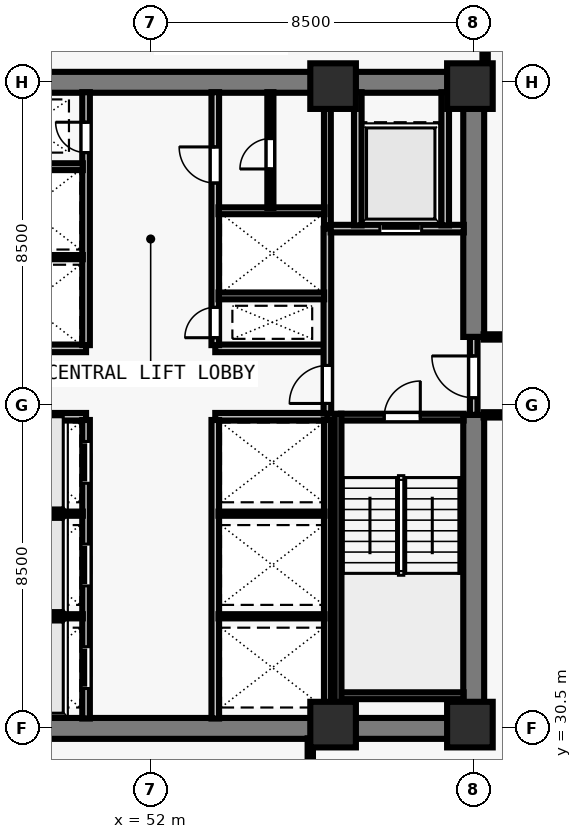
"""IFC4 building model, lengths in metres.
Left out: names, types, materials, properties, quantities, classifications, styles, units other than length and angle.
Written with IfcOpenShell. Run it as: python <this file> out.ifc"""

import sys

from ifc_helpers import new_model, si_unit, direction, frame, frame_2d, origin, origin_2d, place, context, subcontext, project, spatial, rectangle, extrude, element, fill, save


model = new_model("IFC4")
c1 = context("Model", 3, precision=1e-05, world=origin(), true_north=direction((0.0, 1.0)))
c2 = subcontext(c1, "Body", "Model", "MODEL_VIEW")
j1 = project(units=[si_unit("LENGTHUNIT", "METRE"), si_unit("PLANEANGLEUNIT", "RADIAN")], contexts=[c1])
p1 = place(None, origin())
s1 = spatial("IfcSite", under=j1, at=p1, CompositionType="ELEMENT")
p2 = place(p1, origin())
s2 = spatial("IfcBuilding", under=s1, at=p2, CompositionType="ELEMENT")
p3 = place(p2, frame((0.0, 0.0, 48.0)))
s3 = spatial("IfcBuildingStorey", under=s2, at=p3, CompositionType="ELEMENT", Elevation=48.0)
for number, where, z_axis, x_axis in (
    (1, (56.8, 30.6, 0.0), (0.0, 0.0, 1.0), (1.0, 0.0, 0.0)),
    (2, (60.4, 30.6, 0.0), (0.0, 0.0, 1.0), (1.0, 0.0, 0.0)),
    (3, (56.8, 47.4, 0.0), (0.0, 0.0, 1.0), (1.0, 0.0, 0.0)),
    (4, (60.4, 47.4, 0.0), (0.0, 0.0, 1.0), (1.0, 0.0, 0.0)),
):
    element("IfcColumn", number, at=place(p3, frame(where, z_axis=z_axis, x_axis=x_axis)), inside=s3, PredefinedType="COLUMN", context=c2, shape_type="SweptSolid", body=[
        extrude(rectangle(XDim=1.2, YDim=1.2, at=origin_2d()), origin(), (0.0, 0.0, 1.0), 3.5),
    ])
for number, where, z_axis, x_axis in (
    (5, (43.225, 30.5, 0.0), (0.0, 0.0, 1.0), (1.0, 0.0, 0.0)),
    (6, (43.225, 47.5, 0.0), (0.0, 0.0, 1.0), (1.0, 0.0, 0.0)),
):
    element("IfcWall", number, at=place(p3, frame(where, z_axis=z_axis, x_axis=x_axis)), inside=s3, PredefinedType="SHEAR", context=c2, shape_type="SweptSolid", body=[
        extrude(rectangle(XDim=17.55, YDim=0.55, at=frame_2d((8.775, 0.0))), origin(), (0.0, 0.0, 1.0), 3.28),
    ])
p4 = place(p3, frame((60.5, 30.765, 0.0), z_axis=(0.0, 0.0, 1.0), x_axis=(0.0, 1.0, 0.0)))
e7 = element("IfcWall", 7, at=p4, inside=s3, PredefinedType="SHEAR", context=c2, shape_type="SweptSolid", body=[
    extrude(rectangle(XDim=7.985, YDim=0.55, at=frame_2d((3.993, 0.0))), origin(), (0.0, 0.0, 1.0), 3.28),
])
p5 = place(p3, frame((60.5, 40.8, 0.0), z_axis=(0.0, 0.0, 1.0), x_axis=(0.0, 1.0, 0.0)))
e8 = element("IfcWall", 8, at=p5, inside=s3, PredefinedType="SHEAR", context=c2, shape_type="SweptSolid", body=[
    extrude(rectangle(XDim=6.435, YDim=0.55, at=frame_2d((3.218, 0.0))), origin(), (0.0, 0.0, 1.0), 3.28),
])
for number, where, z_axis, x_axis in (
    (9, (47.35, 38.7, 0.0), (0.0, 0.0, 1.0), (1.0, 0.0, 0.0)),
    (10, (47.35, 40.5, 0.0), (0.0, 0.0, 1.0), (1.0, 0.0, 0.0)),
    (11, (53.7, 38.7, 0.0), (0.0, 0.0, 1.0), (1.0, 0.0, 0.0)),
    (12, (53.7, 40.5, 0.0), (0.0, 0.0, 1.0), (1.0, 0.0, 0.0)),
):
    element("IfcWall", number, at=place(p3, frame(where, z_axis=z_axis, x_axis=x_axis)), inside=s3, PredefinedType="SOLIDWALL", context=c2, shape_type="SweptSolid", body=[
        extrude(rectangle(XDim=2.95, YDim=0.2, at=frame_2d((1.475, 0.0))), origin(), (0.0, 0.0, 1.0), 3.28),
    ])
p6 = place(p3, frame((50.3, 30.76, 0.0), z_axis=(0.0, 0.0, 1.0), x_axis=(0.0, 1.0, 0.0)))
e13 = element("IfcWall", 13, at=p6, inside=s3, PredefinedType="SOLIDWALL", context=c2, shape_type="SweptSolid", body=[
    extrude(rectangle(XDim=7.855, YDim=0.2, at=frame_2d((3.927, 0.0))), origin(), (0.0, 0.0, 1.0), 3.28),
])
p7 = place(p6, frame((0.79, 0.0, 0.0)))
e14 = element("IfcOpeningElement", 14, at=p7, cuts=e13, PredefinedType="OPENING", context=c2, shape_type="SweptSolid", body=[
    extrude(rectangle(XDim=1.1, YDim=2.2, at=frame_2d((0.55, 1.1))), frame((0.0, 0.11, 0.0), z_axis=(0.0, -1.0, 0.0), x_axis=(1.0, 0.0, 0.0)), (0.0, 0.0, 1.0), 0.22),
])
p8 = place(p6, frame((3.49, 0.0, 0.0)))
e15 = element("IfcOpeningElement", 15, at=p8, cuts=e13, PredefinedType="OPENING", context=c2, shape_type="SweptSolid", body=[
    extrude(rectangle(XDim=1.1, YDim=2.2, at=frame_2d((0.55, 1.1))), frame((0.0, 0.11, 0.0), z_axis=(0.0, -1.0, 0.0), x_axis=(1.0, 0.0, 0.0)), (0.0, 0.0, 1.0), 0.22),
])
p9 = place(p6, frame((6.19, 0.0, 0.0)))
e16 = element("IfcOpeningElement", 16, at=p9, cuts=e13, PredefinedType="OPENING", context=c2, shape_type="SweptSolid", body=[
    extrude(rectangle(XDim=1.1, YDim=2.2, at=frame_2d((0.55, 1.1))), frame((0.0, 0.11, 0.0), z_axis=(0.0, -1.0, 0.0), x_axis=(1.0, 0.0, 0.0)), (0.0, 0.0, 1.0), 0.22),
])
p10 = place(p3, frame((53.7, 30.76, 0.0), z_axis=(0.0, 0.0, 1.0), x_axis=(0.0, 1.0, 0.0)))
e17 = element("IfcWall", 17, at=p10, inside=s3, PredefinedType="SOLIDWALL", context=c2, shape_type="SweptSolid", body=[
    extrude(rectangle(XDim=7.855, YDim=0.2, at=frame_2d((3.927, 0.0))), origin(), (0.0, 0.0, 1.0), 3.28),
])
p11 = place(p3, frame((50.3, 40.585, 0.0), z_axis=(0.0, 0.0, 1.0), x_axis=(0.0, 1.0, 0.0)))
e18 = element("IfcWall", 18, at=p11, inside=s3, PredefinedType="SOLIDWALL", context=c2, shape_type="SweptSolid", body=[
    extrude(rectangle(XDim=6.655, YDim=0.2, at=frame_2d((3.328, 0.0))), origin(), (0.0, 0.0, 1.0), 3.28),
])
p12 = place(p11, frame((5.065, 0.0, 0.0)))
e19 = element("IfcOpeningElement", 19, at=p12, cuts=e18, PredefinedType="OPENING", context=c2, shape_type="SweptSolid", body=[
    extrude(rectangle(XDim=0.8, YDim=2.08, at=frame_2d((0.4, 1.04))), frame((0.0, 0.11, 0.0), z_axis=(0.0, -1.0, 0.0), x_axis=(1.0, 0.0, 0.0)), (0.0, 0.0, 1.0), 0.22),
])
p13 = place(p3, frame((53.7, 40.585, 0.0), z_axis=(0.0, 0.0, 1.0), x_axis=(0.0, 1.0, 0.0)))
e20 = element("IfcWall", 20, at=p13, inside=s3, PredefinedType="SOLIDWALL", context=c2, shape_type="SweptSolid", body=[
    extrude(rectangle(XDim=6.655, YDim=0.2, at=frame_2d((3.328, 0.0))), origin(), (0.0, 0.0, 1.0), 3.28),
])
p14 = place(p13, frame((0.195, 0.0, 0.0)))
e21 = element("IfcOpeningElement", 21, at=p14, cuts=e20, PredefinedType="OPENING", context=c2, shape_type="SweptSolid", body=[
    extrude(rectangle(XDim=0.8, YDim=2.08, at=frame_2d((0.4, 1.04))), frame((0.0, 0.11, 0.0), z_axis=(0.0, -1.0, 0.0), x_axis=(1.0, 0.0, 0.0)), (0.0, 0.0, 1.0), 0.22),
])
p15 = place(p13, frame((4.265, 0.0, 0.0)))
e22 = element("IfcOpeningElement", 22, at=p15, cuts=e20, PredefinedType="OPENING", context=c2, shape_type="SweptSolid", body=[
    extrude(rectangle(XDim=0.95, YDim=2.12, at=frame_2d((0.475, 1.06))), frame((0.0, 0.11, 0.0), z_axis=(0.0, -1.0, 0.0), x_axis=(1.0, 0.0, 0.0)), (0.0, 0.0, 1.0), 0.22),
])
p16 = place(p3, frame((60.5, 38.75, 0.0), z_axis=(0.0, 0.0, 1.0), x_axis=(0.0, 1.0, 0.0)))
e23 = element("IfcWall", 23, at=p16, inside=s3, PredefinedType="SOLIDWALL", context=c2, shape_type="SweptSolid", body=[
    extrude(rectangle(XDim=2.05, YDim=0.2, at=frame_2d((1.025, 0.0))), origin(), (0.0, 0.0, 1.0), 3.28),
])
p17 = place(p16, frame((0.45, 0.0, 0.0)))
e24 = element("IfcOpeningElement", 24, at=p17, cuts=e23, PredefinedType="OPENING", context=c2, shape_type="SweptSolid", body=[
    extrude(rectangle(XDim=1.1, YDim=2.15, at=frame_2d((0.55, 1.075))), frame((0.0, 0.11, 0.0), z_axis=(0.0, -1.0, 0.0), x_axis=(1.0, 0.0, 0.0)), (0.0, 0.0, 1.0), 0.22),
])
p18 = place(p3, frame((56.65, 38.785, 0.0), z_axis=(0.0, 0.0, 1.0), x_axis=(0.0, 1.0, 0.0)))
e25 = element("IfcWall", 25, at=p18, inside=s3, PredefinedType="SOLIDWALL", context=c2, shape_type="SweptSolid", body=[
    extrude(rectangle(XDim=4.865, YDim=0.2, at=frame_2d((2.433, 0.0))), origin(), (0.0, 0.0, 1.0), 3.28),
])
p19 = place(p18, frame((0.265, 0.0, 0.0)))
e26 = element("IfcOpeningElement", 26, at=p19, cuts=e25, PredefinedType="OPENING", context=c2, shape_type="SweptSolid", body=[
    extrude(rectangle(XDim=1.0, YDim=2.15, at=frame_2d((0.5, 1.075))), frame((0.0, 0.11, 0.0), z_axis=(0.0, -1.0, 0.0), x_axis=(1.0, 0.0, 0.0)), (0.0, 0.0, 1.0), 0.22),
])
p20 = place(p3, frame((56.735, 43.65, 0.0), z_axis=(0.0, 0.0, 1.0), x_axis=(1.0, 0.0, 0.0)))
e27 = element("IfcWall", 27, at=p20, inside=s3, PredefinedType="SOLIDWALL", context=c2, shape_type="SweptSolid", body=[
    extrude(rectangle(XDim=3.505, YDim=0.2, at=frame_2d((1.752, 0.0))), origin(), (0.0, 0.0, 1.0), 3.28),
])
p21 = place(p20, frame((1.295, 0.0, 0.0)))
e28 = element("IfcOpeningElement", 28, at=p21, cuts=e27, PredefinedType="OPENING", context=c2, shape_type="SweptSolid", body=[
    extrude(rectangle(XDim=1.1, YDim=2.2, at=frame_2d((0.55, 1.1))), frame((0.0, 0.11, 0.0), z_axis=(0.0, -1.0, 0.0), x_axis=(1.0, 0.0, 0.0)), (0.0, 0.0, 1.0), 0.22),
])
for number, where, z_axis, x_axis in (
    (29, (57.45, 43.735, 0.0), (0.0, 0.0, 1.0), (0.0, 1.0, 0.0)),
    (30, (59.75, 43.735, 0.0), (0.0, 0.0, 1.0), (0.0, 1.0, 0.0)),
):
    element("IfcWall", number, at=place(p3, frame(where, z_axis=z_axis, x_axis=x_axis)), inside=s3, PredefinedType="SOLIDWALL", context=c2, shape_type="SweptSolid", body=[
        extrude(rectangle(XDim=3.505, YDim=0.2, at=frame_2d((1.752, 0.0))), origin(), (0.0, 0.0, 1.0), 3.28),
    ])
for number, where, z_axis, x_axis in (
    (31, (47.425, 33.45, 0.0), (0.0, 0.0, 1.0), (1.0, 0.0, 0.0)),
    (32, (47.425, 36.15, 0.0), (0.0, 0.0, 1.0), (1.0, 0.0, 0.0)),
):
    element("IfcWall", number, at=place(p3, frame(where, z_axis=z_axis, x_axis=x_axis)), inside=s3, PredefinedType="PARTITIONING", context=c2, shape_type="SweptSolid", body=[
        extrude(rectangle(XDim=2.79, YDim=0.11, at=frame_2d((1.395, 0.0))), origin(), (0.0, 0.0, 1.0), 3.28),
    ])
p22 = place(p3, frame((56.65, 30.76, 0.0), z_axis=(0.0, 0.0, 1.0), x_axis=(0.0, 1.0, 0.0)))
e33 = element("IfcWall", 33, at=p22, inside=s3, PredefinedType="SOLIDWALL", context=c2, shape_type="SweptSolid", body=[
    extrude(rectangle(XDim=7.855, YDim=0.18, at=frame_2d((3.927, 0.0))), origin(), (0.0, 0.0, 1.0), 3.28),
])
for number, where, z_axis, x_axis in (
    (34, (53.785, 33.45, 0.0), (0.0, 0.0, 1.0), (1.0, 0.0, 0.0)),
    (35, (53.785, 36.15, 0.0), (0.0, 0.0, 1.0), (1.0, 0.0, 0.0)),
):
    element("IfcWall", number, at=place(p3, frame(where, z_axis=z_axis, x_axis=x_axis)), inside=s3, PredefinedType="PARTITIONING", context=c2, shape_type="SweptSolid", body=[
        extrude(rectangle(XDim=2.79, YDim=0.11, at=frame_2d((1.395, 0.0))), origin(), (0.0, 0.0, 1.0), 3.28),
    ])
p23 = place(p3, frame((47.435, 42.9, 0.0), z_axis=(0.0, 0.0, 1.0), x_axis=(1.0, 0.0, 0.0)))
e36 = element("IfcWall", 36, at=p23, inside=s3, PredefinedType="PARTITIONING", context=c2, shape_type="SweptSolid", body=[
    extrude(rectangle(XDim=2.78, YDim=0.11, at=frame_2d((1.39, 0.0))), origin(), (0.0, 0.0, 1.0), 3.28),
])
p24 = place(p3, frame((47.425, 45.28, 0.0), z_axis=(0.0, 0.0, 1.0), x_axis=(1.0, 0.0, 0.0)))
e37 = element("IfcWall", 37, at=p24, inside=s3, PredefinedType="SOLIDWALL", context=c2, shape_type="SweptSolid", body=[
    extrude(rectangle(XDim=2.79, YDim=0.18, at=frame_2d((1.395, 0.0))), origin(), (0.0, 0.0, 1.0), 3.28),
])
p25 = place(p3, frame((56.65, 43.735, 0.0), z_axis=(0.0, 0.0, 1.0), x_axis=(0.0, 1.0, 0.0)))
e38 = element("IfcWall", 38, at=p25, inside=s3, PredefinedType="SOLIDWALL", context=c2, shape_type="SweptSolid", body=[
    extrude(rectangle(XDim=3.505, YDim=0.18, at=frame_2d((1.752, 0.0))), origin(), (0.0, 0.0, 1.0), 3.28),
])
p26 = place(p3, frame((53.785, 41.88, 0.0), z_axis=(0.0, 0.0, 1.0), x_axis=(1.0, 0.0, 0.0)))
e39 = element("IfcWall", 39, at=p26, inside=s3, PredefinedType="SOLIDWALL", context=c2, shape_type="SweptSolid", body=[
    extrude(rectangle(XDim=2.78, YDim=0.18, at=frame_2d((1.39, 0.0))), origin(), (0.0, 0.0, 1.0), 3.28),
])
p27 = place(p3, frame((53.785, 44.12, 0.0), z_axis=(0.0, 0.0, 1.0), x_axis=(1.0, 0.0, 0.0)))
e40 = element("IfcWall", 40, at=p27, inside=s3, PredefinedType="SOLIDWALL", context=c2, shape_type="SweptSolid", body=[
    extrude(rectangle(XDim=2.79, YDim=0.18, at=frame_2d((1.395, 0.0))), origin(), (0.0, 0.0, 1.0), 3.28),
])
p28 = place(p3, frame((55.15, 44.195, 0.0), z_axis=(0.0, 0.0, 1.0), x_axis=(0.0, 1.0, 0.0)))
e41 = element("IfcWall", 41, at=p28, inside=s3, PredefinedType="PARTITIONING", context=c2, shape_type="SweptSolid", body=[
    extrude(rectangle(XDim=3.045, YDim=0.16, at=frame_2d((1.522, 0.0))), origin(), (0.0, 0.0, 1.0), 3.28),
])
p29 = place(p28, frame((1.025, 0.0, 0.0)))
e42 = element("IfcOpeningElement", 42, at=p29, cuts=e41, PredefinedType="OPENING", context=c2, shape_type="SweptSolid", body=[
    extrude(rectangle(XDim=0.8, YDim=2.1, at=frame_2d((0.4, 1.05))), frame((0.0, 0.09, 0.0), z_axis=(0.0, -1.0, 0.0), x_axis=(1.0, 0.0, 0.0)), (0.0, 0.0, 1.0), 0.18),
])
for number, where, z_axis, x_axis in (
    (43, (60.76, 38.75, 0.0), (0.0, 0.0, 1.0), (1.0, 0.0, 0.0)),
    (44, (60.76, 40.8, 0.0), (0.0, 0.0, 1.0), (1.0, 0.0, 0.0)),
):
    element("IfcWall", number, at=place(p3, frame(where, z_axis=z_axis, x_axis=x_axis)), inside=s3, PredefinedType="PARTITIONING", context=c2, shape_type="SweptSolid", body=[
        extrude(rectangle(XDim=4.385, YDim=0.14, at=frame_2d((2.192, 0.0))), origin(), (0.0, 0.0, 1.0), 3.28),
    ])
p30 = place(p3, frame((56.2, 25.555, 0.0), z_axis=(0.0, 0.0, 1.0), x_axis=(0.0, 1.0, 0.0)))
e45 = element("IfcWall", 45, at=p30, inside=s3, PredefinedType="PARTITIONING", context=c2, shape_type="SweptSolid", body=[
    extrude(rectangle(XDim=4.685, YDim=0.14, at=frame_2d((2.343, 0.0))), origin(), (0.0, 0.0, 1.0), 2.849),
])
p31 = place(p3, frame((60.8, 47.76, 0.0), z_axis=(0.0, 0.0, 1.0), x_axis=(0.0, 1.0, 0.0)))
e46 = element("IfcWall", 46, at=p31, inside=s3, PredefinedType="PARTITIONING", context=c2, shape_type="SweptSolid", body=[
    extrude(rectangle(XDim=4.685, YDim=0.14, at=frame_2d((2.343, 0.0))), origin(), (0.0, 0.0, 1.0), 2.439),
])
p32 = place(p3, frame((57.005, 38.69, 0.0), z_axis=(0.0, 0.0, 1.0), x_axis=(1.0, 0.0, 0.0)))
e47 = element("IfcWall", 47, at=p32, inside=s3, PredefinedType="SOLIDWALL", context=c2, shape_type="SweptSolid", body=[
    extrude(rectangle(XDim=3.23, YDim=0.18, at=frame_2d((1.615, 0.0))), origin(), (0.0, 0.0, 1.0), 3.28),
])
p33 = place(p32, frame((1.14, 0.0, 0.0)))
e48 = element("IfcOpeningElement", 48, at=p33, cuts=e47, PredefinedType="OPENING", context=c2, shape_type="SweptSolid", body=[
    extrude(rectangle(XDim=0.95, YDim=2.15, at=frame_2d((0.475, 1.075))), frame((0.0, 0.1, 0.0), z_axis=(0.0, -1.0, 0.0), x_axis=(1.0, 0.0, 0.0)), (0.0, 0.0, 1.0), 0.2),
])
p34 = place(p3, frame((57.005, 31.36, 0.0), z_axis=(0.0, 0.0, 1.0), x_axis=(1.0, 0.0, 0.0)))
e49 = element("IfcWall", 49, at=p34, inside=s3, PredefinedType="SOLIDWALL", context=c2, shape_type="SweptSolid", body=[
    extrude(rectangle(XDim=3.23, YDim=0.18, at=frame_2d((1.615, 0.0))), origin(), (0.0, 0.0, 1.0), 3.28),
])
p35 = place(p3, frame((56.93, 38.78, 0.0), z_axis=(0.0, 0.0, 1.0), x_axis=(0.0, -1.0, 0.0)))
e50 = element("IfcWall", 50, at=p35, inside=s3, PredefinedType="SOLIDWALL", context=c2, shape_type="SweptSolid", body=[
    extrude(rectangle(XDim=8.017, YDim=0.18, at=frame_2d((4.009, 0.0))), origin(), (0.0, 0.0, 1.0), 3.28),
])
p36 = place(p17, origin())
e51 = element("IfcDoor", 51, at=p36, inside=s3, OperationType="SINGLE_SWING_RIGHT", PredefinedType="DOOR", context=c2, shape_type="SweptSolid", body=[
    extrude(rectangle(XDim=1.1, YDim=2.15, at=frame_2d((0.55, 1.075))), frame((0.0, 0.025, 0.0), z_axis=(0.0, -1.0, 0.0), x_axis=(1.0, 0.0, 0.0)), (0.0, 0.0, 1.0), 0.05),
])
fill(e24, e51)
p37 = place(p19, origin())
e52 = element("IfcDoor", 52, at=p37, inside=s3, OperationType="SINGLE_SWING_LEFT", PredefinedType="DOOR", context=c2, shape_type="SweptSolid", body=[
    extrude(rectangle(XDim=1.0, YDim=2.15, at=frame_2d((0.5, 1.075))), frame((0.0, 0.025, 0.0), z_axis=(0.0, -1.0, 0.0), x_axis=(1.0, 0.0, 0.0)), (0.0, 0.0, 1.0), 0.05),
])
fill(e26, e52)
p38 = place(p21, origin())
e53 = element("IfcDoor", 53, at=p38, inside=s3, OperationType="SLIDING_TO_LEFT", PredefinedType="DOOR", context=c2, shape_type="SweptSolid", body=[
    extrude(rectangle(XDim=1.1, YDim=2.2, at=frame_2d((0.55, 1.1))), frame((0.0, 0.025, 0.0), z_axis=(0.0, -1.0, 0.0), x_axis=(1.0, 0.0, 0.0)), (0.0, 0.0, 1.0), 0.05),
])
fill(e28, e53)
p39 = place(p7, origin())
e54 = element("IfcDoor", 54, at=p39, inside=s3, OperationType="SLIDING_TO_LEFT", PredefinedType="DOOR", context=c2, shape_type="SweptSolid", body=[
    extrude(rectangle(XDim=1.1, YDim=2.2, at=frame_2d((0.55, 1.1))), frame((0.0, 0.025, 0.0), z_axis=(0.0, -1.0, 0.0), x_axis=(1.0, 0.0, 0.0)), (0.0, 0.0, 1.0), 0.05),
])
fill(e14, e54)
p40 = place(p8, origin())
e55 = element("IfcDoor", 55, at=p40, inside=s3, OperationType="SLIDING_TO_LEFT", PredefinedType="DOOR", context=c2, shape_type="SweptSolid", body=[
    extrude(rectangle(XDim=1.1, YDim=2.2, at=frame_2d((0.55, 1.1))), frame((0.0, 0.025, 0.0), z_axis=(0.0, -1.0, 0.0), x_axis=(1.0, 0.0, 0.0)), (0.0, 0.0, 1.0), 0.05),
])
fill(e15, e55)
p41 = place(p9, origin())
e56 = element("IfcDoor", 56, at=p41, inside=s3, OperationType="SLIDING_TO_LEFT", PredefinedType="DOOR", context=c2, shape_type="SweptSolid", body=[
    extrude(rectangle(XDim=1.1, YDim=2.2, at=frame_2d((0.55, 1.1))), frame((0.0, 0.025, 0.0), z_axis=(0.0, -1.0, 0.0), x_axis=(1.0, 0.0, 0.0)), (0.0, 0.0, 1.0), 0.05),
])
fill(e16, e56)
p42 = place(p12, origin())
e57 = element("IfcDoor", 57, at=p42, inside=s3, OperationType="SINGLE_SWING_RIGHT", PredefinedType="DOOR", context=c2, shape_type="SweptSolid", body=[
    extrude(rectangle(XDim=0.8, YDim=2.08, at=frame_2d((0.4, 1.04))), frame((0.0, 0.025, 0.0), z_axis=(0.0, -1.0, 0.0), x_axis=(1.0, 0.0, 0.0)), (0.0, 0.0, 1.0), 0.05),
])
fill(e19, e57)
p43 = place(p14, origin())
e58 = element("IfcDoor", 58, at=p43, inside=s3, OperationType="SINGLE_SWING_LEFT", PredefinedType="DOOR", context=c2, shape_type="SweptSolid", body=[
    extrude(rectangle(XDim=0.8, YDim=2.08, at=frame_2d((0.4, 1.04))), frame((0.0, 0.025, 0.0), z_axis=(0.0, -1.0, 0.0), x_axis=(1.0, 0.0, 0.0)), (0.0, 0.0, 1.0), 0.05),
])
fill(e21, e58)
p44 = place(p15, origin())
e59 = element("IfcDoor", 59, at=p44, inside=s3, OperationType="SINGLE_SWING_RIGHT", PredefinedType="DOOR", context=c2, shape_type="SweptSolid", body=[
    extrude(rectangle(XDim=0.95, YDim=2.12, at=frame_2d((0.475, 1.06))), frame((0.0, 0.025, 0.0), z_axis=(0.0, -1.0, 0.0), x_axis=(1.0, 0.0, 0.0)), (0.0, 0.0, 1.0), 0.05),
])
fill(e22, e59)
p45 = place(p29, origin())
e60 = element("IfcDoor", 60, at=p45, inside=s3, OperationType="SINGLE_SWING_LEFT", PredefinedType="DOOR", context=c2, shape_type="SweptSolid", body=[
    extrude(rectangle(XDim=0.8, YDim=2.1, at=frame_2d((0.4, 1.05))), frame((0.0, 0.025, 0.0), z_axis=(0.0, -1.0, 0.0), x_axis=(1.0, 0.0, 0.0)), (0.0, 0.0, 1.0), 0.05),
])
fill(e42, e60)
p46 = place(p33, origin())
e61 = element("IfcDoor", 61, at=p46, inside=s3, OperationType="SINGLE_SWING_RIGHT", PredefinedType="DOOR", context=c2, shape_type="SweptSolid", body=[
    extrude(rectangle(XDim=0.95, YDim=2.15, at=frame_2d((0.475, 1.075))), frame((0.0, 0.025, 0.0), z_axis=(0.0, -1.0, 0.0), x_axis=(1.0, 0.0, 0.0)), (0.0, 0.0, 1.0), 0.05),
])
fill(e48, e61)
save(model, sys.argv[1])
